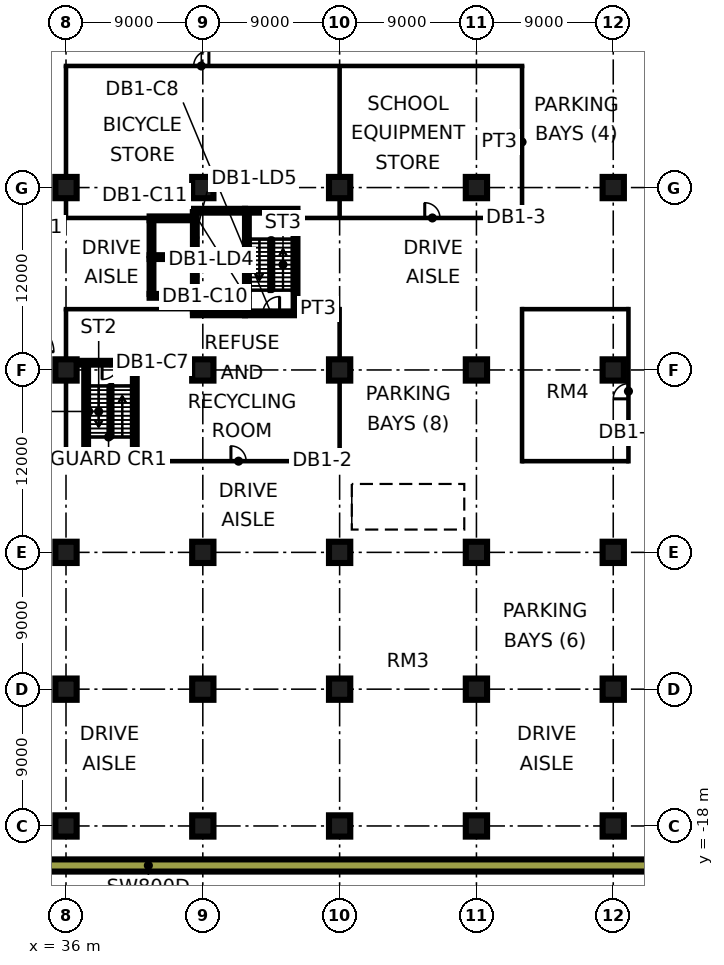
"""IFC4 building model, lengths in metres.
Left out: names, types, materials, properties, quantities, classifications, styles, units other than length and angle.
Written with IfcOpenShell. Run it as: python <this file> out.ifc"""

import sys

from ifc_helpers import new_model, si_unit, direction, frame, frame_2d, origin, origin_2d, place, context, subcontext, project, spatial, rectangle, extrude, element, fill, save


model = new_model("IFC4")
c1 = context("Model", 3, precision=1e-05, world=origin(), true_north=direction((0.0, 1.0)))
c2 = subcontext(c1, "Body", "Model", "MODEL_VIEW")
j1 = project(units=[si_unit("LENGTHUNIT", "METRE"), si_unit("PLANEANGLEUNIT", "RADIAN")], contexts=[c1])
p1 = place(None, origin())
s1 = spatial("IfcSite", under=j1, at=p1, CompositionType="ELEMENT")
p2 = place(p1, origin())
s2 = spatial("IfcBuilding", under=s1, at=p2, CompositionType="ELEMENT")
p3 = place(p2, frame((0.0, 0.0, -4.5)))
s3 = spatial("IfcBuildingStorey", under=s2, at=p3, CompositionType="ELEMENT", Elevation=-4.5)
for number, where, z_axis, x_axis in (
    (1, (36.0, -18.0, 0.0), (0.0, 0.0, 1.0), (1.0, 0.0, 0.0)),
    (2, (36.0, -9.0, 0.0), (0.0, 0.0, 1.0), (1.0, 0.0, 0.0)),
    (3, (36.0, 0.0, 0.0), (0.0, 0.0, 1.0), (1.0, 0.0, 0.0)),
    (4, (36.0, 12.0, 0.0), (0.0, 0.0, 1.0), (1.0, 0.0, 0.0)),
    (5, (36.0, 24.0, 0.0), (0.0, 0.0, 1.0), (1.0, 0.0, 0.0)),
    (6, (45.0, -18.0, 0.0), (0.0, 0.0, 1.0), (1.0, 0.0, 0.0)),
    (7, (45.0, -9.0, 0.0), (0.0, 0.0, 1.0), (1.0, 0.0, 0.0)),
    (8, (45.0, 0.0, 0.0), (0.0, 0.0, 1.0), (1.0, 0.0, 0.0)),
    (9, (45.0, 12.0, 0.0), (0.0, 0.0, 1.0), (1.0, 0.0, 0.0)),
    (10, (45.0, 24.0, 0.0), (0.0, 0.0, 1.0), (1.0, 0.0, 0.0)),
    (11, (54.0, -18.0, 0.0), (0.0, 0.0, 1.0), (1.0, 0.0, 0.0)),
    (12, (54.0, -9.0, 0.0), (0.0, 0.0, 1.0), (1.0, 0.0, 0.0)),
    (13, (54.0, 0.0, 0.0), (0.0, 0.0, 1.0), (1.0, 0.0, 0.0)),
    (14, (54.0, 12.0, 0.0), (0.0, 0.0, 1.0), (1.0, 0.0, 0.0)),
    (15, (54.0, 24.0, 0.0), (0.0, 0.0, 1.0), (1.0, 0.0, 0.0)),
    (16, (63.0, -18.0, 0.0), (0.0, 0.0, 1.0), (1.0, 0.0, 0.0)),
    (17, (63.0, -9.0, 0.0), (0.0, 0.0, 1.0), (1.0, 0.0, 0.0)),
    (18, (63.0, 0.0, 0.0), (0.0, 0.0, 1.0), (1.0, 0.0, 0.0)),
    (19, (63.0, 12.0, 0.0), (0.0, 0.0, 1.0), (1.0, 0.0, 0.0)),
    (20, (63.0, 24.0, 0.0), (0.0, 0.0, 1.0), (1.0, 0.0, 0.0)),
    (21, (72.0, -18.0, 0.0), (0.0, 0.0, 1.0), (1.0, 0.0, 0.0)),
    (22, (72.0, -9.0, 0.0), (0.0, 0.0, 1.0), (1.0, 0.0, 0.0)),
    (23, (72.0, 0.0, 0.0), (0.0, 0.0, 1.0), (1.0, 0.0, 0.0)),
    (24, (72.0, 12.0, 0.0), (0.0, 0.0, 1.0), (1.0, 0.0, 0.0)),
    (25, (72.0, 24.0, 0.0), (0.0, 0.0, 1.0), (1.0, 0.0, 0.0)),
):
    element("IfcColumn", number, at=place(p3, frame(where, z_axis=z_axis, x_axis=x_axis)), inside=s3, PredefinedType="COLUMN", context=c2, shape_type="SweptSolid", body=[
        extrude(rectangle(XDim=1.4, YDim=1.4, at=origin_2d()), origin(), (0.0, 0.0, 1.0), 4.5),
    ])
p4 = place(p3, frame((37.2, 5.725, 0.0), z_axis=(0.0, 0.0, 1.0), x_axis=(1.0, 0.0, 0.0)))
e26 = element("IfcWall", 26, at=p4, inside=s3, PredefinedType="SHEAR", context=c2, shape_type="SweptSolid", body=[
    extrude(rectangle(XDim=3.45, YDim=0.25, at=frame_2d((1.725, 0.0))), origin(), (0.0, 0.0, 1.0), 4.5),
])
p5 = place(p3, frame((36.7, 12.475, 0.0), z_axis=(0.0, 0.0, 1.0), x_axis=(1.0, 0.0, 0.0)))
e27 = element("IfcWall", 27, at=p5, inside=s3, PredefinedType="SHEAR", context=c2, shape_type="SweptSolid", body=[
    extrude(rectangle(XDim=3.95, YDim=0.25, at=frame_2d((1.975, 0.0))), origin(), (0.0, 0.0, 1.0), 4.5),
])
p6 = place(p5, frame((1.675, 0.0, 0.0)))
e28 = element("IfcOpeningElement", 28, at=p6, cuts=e27, PredefinedType="OPENING", context=c2, shape_type="SweptSolid", body=[
    extrude(rectangle(XDim=1.1, YDim=2.2, at=frame_2d((0.55, 1.1))), frame((0.0, 0.135, 0.0), z_axis=(0.0, -1.0, 0.0), x_axis=(1.0, 0.0, 0.0)), (0.0, 0.0, 1.0), 0.27),
])
for number, where, z_axis, x_axis in (
    (29, (37.325, 5.85, 0.0), (0.0, 0.0, 1.0), (0.0, 1.0, 0.0)),
    (30, (40.525, 5.85, 0.0), (0.0, 0.0, 1.0), (0.0, 1.0, 0.0)),
):
    element("IfcWall", number, at=place(p3, frame(where, z_axis=z_axis, x_axis=x_axis)), inside=s3, PredefinedType="SHEAR", context=c2, shape_type="SweptSolid", body=[
        extrude(rectangle(XDim=6.5, YDim=0.25, at=frame_2d((3.25, 0.0))), origin(), (0.0, 0.0, 1.0), 4.5),
    ])
p7 = place(p3, frame((47.775, 15.725, 0.0), z_axis=(0.0, 0.0, 1.0), x_axis=(1.0, 0.0, 0.0)))
e31 = element("IfcWall", 31, at=p7, inside=s3, PredefinedType="SHEAR", context=c2, shape_type="SweptSolid", body=[
    extrude(rectangle(XDim=3.45, YDim=0.25, at=frame_2d((1.725, 0.0))), origin(), (0.0, 0.0, 1.0), 4.5),
])
p8 = place(p7, frame((1.175, 0.0, 0.0)))
e32 = element("IfcOpeningElement", 32, at=p8, cuts=e31, PredefinedType="OPENING", context=c2, shape_type="SweptSolid", body=[
    extrude(rectangle(XDim=1.1, YDim=2.2, at=frame_2d((0.55, 1.1))), frame((0.0, 0.135, 0.0), z_axis=(0.0, -1.0, 0.0), x_axis=(1.0, 0.0, 0.0)), (0.0, 0.0, 1.0), 0.27),
])
p9 = place(p3, frame((47.775, 22.475, 0.0), z_axis=(0.0, 0.0, 1.0), x_axis=(1.0, 0.0, 0.0)))
e33 = element("IfcWall", 33, at=p9, inside=s3, PredefinedType="SHEAR", context=c2, shape_type="SweptSolid", body=[
    extrude(rectangle(XDim=3.45, YDim=0.25, at=frame_2d((1.725, 0.0))), origin(), (0.0, 0.0, 1.0), 4.5),
])
p10 = place(p3, frame((47.9, 15.85, 0.0), z_axis=(0.0, 0.0, 1.0), x_axis=(0.0, 1.0, 0.0)))
e34 = element("IfcWall", 34, at=p10, inside=s3, PredefinedType="SHEAR", context=c2, shape_type="SweptSolid", body=[
    extrude(rectangle(XDim=6.5, YDim=0.25, at=frame_2d((3.25, 0.0))), origin(), (0.0, 0.0, 1.0), 4.5),
])
p11 = place(p10, frame((0.35, 0.0, 0.0)))
e35 = element("IfcOpeningElement", 35, at=p11, cuts=e34, PredefinedType="OPENING", context=c2, shape_type="SweptSolid", body=[
    extrude(rectangle(XDim=1.1, YDim=2.2, at=frame_2d((0.55, 1.1))), frame((0.0, 0.135, 0.0), z_axis=(0.0, -1.0, 0.0), x_axis=(1.0, 0.0, 0.0)), (0.0, 0.0, 1.0), 0.27),
])
p12 = place(p3, frame((51.1, 15.85, 0.0), z_axis=(0.0, 0.0, 1.0), x_axis=(0.0, 1.0, 0.0)))
e36 = element("IfcWall", 36, at=p12, inside=s3, PredefinedType="SHEAR", context=c2, shape_type="SweptSolid", body=[
    extrude(rectangle(XDim=6.5, YDim=0.25, at=frame_2d((3.25, 0.0))), origin(), (0.0, 0.0, 1.0), 4.5),
])
p13 = place(p3, frame((44.35, 15.725, 0.0), z_axis=(0.0, 0.0, 1.0), x_axis=(1.0, 0.0, 0.0)))
e37 = element("IfcWall", 37, at=p13, inside=s3, PredefinedType="SHEAR", context=c2, shape_type="SweptSolid", body=[
    extrude(rectangle(XDim=3.425, YDim=0.25, at=frame_2d((1.712, 0.0))), origin(), (0.0, 0.0, 1.0), 4.5),
])
p14 = place(p13, frame((1.25, 0.0, 0.0)))
e38 = element("IfcOpeningElement", 38, at=p14, cuts=e37, PredefinedType="OPENING", context=c2, shape_type="SweptSolid", body=[
    extrude(rectangle(XDim=1.2, YDim=2.2, at=frame_2d((0.6, 1.1))), frame((0.0, 0.135, 0.0), z_axis=(0.0, -1.0, 0.0), x_axis=(1.0, 0.0, 0.0)), (0.0, 0.0, 1.0), 0.27),
])
p15 = place(p3, frame((44.35, 22.475, 0.0), z_axis=(0.0, 0.0, 1.0), x_axis=(1.0, 0.0, 0.0)))
e39 = element("IfcWall", 39, at=p15, inside=s3, PredefinedType="SHEAR", context=c2, shape_type="SweptSolid", body=[
    extrude(rectangle(XDim=3.425, YDim=0.25, at=frame_2d((1.712, 0.0))), origin(), (0.0, 0.0, 1.0), 4.5),
])
p16 = place(p3, frame((44.475, 15.85, 0.0), z_axis=(0.0, 0.0, 1.0), x_axis=(0.0, 1.0, 0.0)))
e40 = element("IfcWall", 40, at=p16, inside=s3, PredefinedType="SHEAR", context=c2, shape_type="SweptSolid", body=[
    extrude(rectangle(XDim=6.5, YDim=0.25, at=frame_2d((3.25, 0.0))), origin(), (0.0, 0.0, 1.0), 4.5),
])
p17 = place(p16, frame((1.75, 0.0, 0.0)))
e41 = element("IfcOpeningElement", 41, at=p17, cuts=e40, PredefinedType="OPENING", context=c2, shape_type="SweptSolid", body=[
    extrude(rectangle(XDim=1.1, YDim=2.2, at=frame_2d((0.55, 1.1))), frame((0.0, 0.135, 0.0), z_axis=(0.0, -1.0, 0.0), x_axis=(1.0, 0.0, 0.0)), (0.0, 0.0, 1.0), 0.27),
])
p18 = place(p16, frame((4.3, 0.0, 0.0)))
e42 = element("IfcOpeningElement", 42, at=p18, cuts=e40, PredefinedType="OPENING", context=c2, shape_type="SweptSolid", body=[
    extrude(rectangle(XDim=1.1, YDim=2.2, at=frame_2d((0.55, 1.1))), frame((0.0, 0.135, 0.0), z_axis=(0.0, -1.0, 0.0), x_axis=(1.0, 0.0, 0.0)), (0.0, 0.0, 1.0), 0.27),
])
for number, where, z_axis, x_axis in (
    (43, (41.5, 16.875, 0.0), (0.0, 0.0, 1.0), (1.0, 0.0, 0.0)),
    (44, (41.5, 19.425, 0.0), (0.0, 0.0, 1.0), (1.0, 0.0, 0.0)),
    (45, (41.5, 21.975, 0.0), (0.0, 0.0, 1.0), (1.0, 0.0, 0.0)),
):
    element("IfcWall", number, at=place(p3, frame(where, z_axis=z_axis, x_axis=x_axis)), inside=s3, PredefinedType="SHEAR", context=c2, shape_type="SweptSolid", body=[
        extrude(rectangle(XDim=2.85, YDim=0.25, at=frame_2d((1.425, 0.0))), origin(), (0.0, 0.0, 1.0), 4.5),
    ])
for number, where, z_axis, x_axis in (
    (46, (41.625, 17.0, 0.0), (0.0, 0.0, 1.0), (0.0, 1.0, 0.0)),
    (47, (41.625, 19.55, 0.0), (0.0, 0.0, 1.0), (0.0, 1.0, 0.0)),
):
    element("IfcWall", number, at=place(p3, frame(where, z_axis=z_axis, x_axis=x_axis)), inside=s3, PredefinedType="SHEAR", context=c2, shape_type="SweptSolid", body=[
        extrude(rectangle(XDim=2.3, YDim=0.25, at=frame_2d((1.15, 0.0))), origin(), (0.0, 0.0, 1.0), 4.5),
    ])
p19 = place(p3, frame((4.423, -20.6, 0.0), z_axis=(0.0, 0.0, 1.0), x_axis=(1.0, 0.0, 0.0)))
e48 = element("IfcWall", 48, at=p19, inside=s3, PredefinedType="SOLIDWALL", context=c2, shape_type="SweptSolid", body=[
    extrude(rectangle(XDim=73.989, YDim=0.8, at=frame_2d((36.994, 0.0))), origin(), (0.0, 0.0, 1.0), 4.5),
])
p20 = place(p3, frame((35.95, 16.0, 0.0), z_axis=(0.0, 0.0, 1.0), x_axis=(1.0, 0.0, 0.0)))
e49 = element("IfcWall", 49, at=p20, inside=s3, PredefinedType="PARTITIONING", context=c2, shape_type="SweptSolid", body=[
    extrude(rectangle(XDim=8.4, YDim=0.1, at=frame_2d((4.2, 0.0))), origin(), (0.0, 0.0, 1.0), 4.05),
])
p21 = place(p3, frame((35.95, 22.0, 0.0), z_axis=(0.0, 0.0, 1.0), x_axis=(1.0, 0.0, 0.0)))
e50 = element("IfcWall", 50, at=p21, inside=s3, PredefinedType="PARTITIONING", context=c2, shape_type="SweptSolid", body=[
    extrude(rectangle(XDim=5.55, YDim=0.1, at=frame_2d((2.775, 0.0))), origin(), (0.0, 0.0, 1.0), 4.05),
])
p22 = place(p3, frame((35.95, 32.0, 0.0), z_axis=(0.0, 0.0, 1.0), x_axis=(1.0, 0.0, 0.0)))
e51 = element("IfcWall", 51, at=p22, inside=s3, PredefinedType="PARTITIONING", context=c2, shape_type="SweptSolid", body=[
    extrude(rectangle(XDim=30.1, YDim=0.1, at=frame_2d((15.05, 0.0))), origin(), (0.0, 0.0, 1.0), 4.05),
])
p23 = place(p22, frame((8.45, 0.0, 0.0)))
e52 = element("IfcOpeningElement", 52, at=p23, cuts=e51, PredefinedType="OPENING", context=c2, shape_type="SweptSolid", body=[
    extrude(rectangle(XDim=1.0, YDim=2.1, at=frame_2d((0.5, 1.05))), frame((0.0, 0.06, 0.0), z_axis=(0.0, -1.0, 0.0), x_axis=(1.0, 0.0, 0.0)), (0.0, 0.0, 1.0), 0.12),
])
p24 = place(p3, frame((36.0, 5.95, 0.0), z_axis=(0.0, 0.0, 1.0), x_axis=(0.0, 1.0, 0.0)))
e53 = element("IfcWall", 53, at=p24, inside=s3, PredefinedType="PARTITIONING", context=c2, shape_type="SweptSolid", body=[
    extrude(rectangle(XDim=5.351, YDim=0.1, at=frame_2d((2.676, 0.0))), origin(), (0.0, 0.0, 1.0), 4.05),
])
p25 = place(p3, frame((36.0, 12.699, 0.0), z_axis=(0.0, 0.0, 1.0), x_axis=(0.0, 1.0, 0.0)))
e54 = element("IfcWall", 54, at=p25, inside=s3, PredefinedType="PARTITIONING", context=c2, shape_type="SweptSolid", body=[
    extrude(rectangle(XDim=3.251, YDim=0.1, at=frame_2d((1.625, 0.0))), origin(), (0.0, 0.0, 1.0), 4.05),
])
p26 = place(p3, frame((36.0, 22.05, 0.0), z_axis=(0.0, 0.0, 1.0), x_axis=(0.0, 1.0, 0.0)))
e55 = element("IfcWall", 55, at=p26, inside=s3, PredefinedType="PARTITIONING", context=c2, shape_type="SweptSolid", body=[
    extrude(rectangle(XDim=1.251, YDim=0.1, at=frame_2d((0.625, 0.0))), origin(), (0.0, 0.0, 1.0), 4.05),
])
p27 = place(p3, frame((36.0, 24.699, 0.0), z_axis=(0.0, 0.0, 1.0), x_axis=(0.0, 1.0, 0.0)))
e56 = element("IfcWall", 56, at=p27, inside=s3, PredefinedType="PARTITIONING", context=c2, shape_type="SweptSolid", body=[
    extrude(rectangle(XDim=7.251, YDim=0.1, at=frame_2d((3.625, 0.0))), origin(), (0.0, 0.0, 1.0), 4.05),
])
p28 = place(p3, frame((36.05, 6.0, 0.0), z_axis=(0.0, 0.0, 1.0), x_axis=(1.0, 0.0, 0.0)))
e57 = element("IfcWall", 57, at=p28, inside=s3, PredefinedType="PARTITIONING", context=c2, shape_type="SweptSolid", body=[
    extrude(rectangle(XDim=1.15, YDim=0.1, at=frame_2d((0.575, 0.0))), origin(), (0.0, 0.0, 1.0), 4.05),
])
p29 = place(p3, frame((40.65, 6.0, 0.0), z_axis=(0.0, 0.0, 1.0), x_axis=(1.0, 0.0, 0.0)))
e58 = element("IfcWall", 58, at=p29, inside=s3, PredefinedType="PARTITIONING", context=c2, shape_type="SweptSolid", body=[
    extrude(rectangle(XDim=13.4, YDim=0.1, at=frame_2d((6.7, 0.0))), origin(), (0.0, 0.0, 1.0), 4.05),
])
p30 = place(p29, frame((6.2, 0.0, 0.0)))
e59 = element("IfcOpeningElement", 59, at=p30, cuts=e58, PredefinedType="OPENING", context=c2, shape_type="SweptSolid", body=[
    extrude(rectangle(XDim=1.0, YDim=2.1, at=frame_2d((0.5, 1.05))), frame((0.0, 0.06, 0.0), z_axis=(0.0, -1.0, 0.0), x_axis=(1.0, 0.0, 0.0)), (0.0, 0.0, 1.0), 0.12),
])
p31 = place(p3, frame((51.225, 16.0, 0.0), z_axis=(0.0, 0.0, 1.0), x_axis=(1.0, 0.0, 0.0)))
e60 = element("IfcWall", 60, at=p31, inside=s3, PredefinedType="PARTITIONING", context=c2, shape_type="SweptSolid", body=[
    extrude(rectangle(XDim=2.725, YDim=0.1, at=frame_2d((1.362, 0.0))), origin(), (0.0, 0.0, 1.0), 4.05),
])
p32 = place(p3, frame((51.225, 22.0, 0.0), z_axis=(0.0, 0.0, 1.0), x_axis=(1.0, 0.0, 0.0)))
e61 = element("IfcWall", 61, at=p32, inside=s3, PredefinedType="PARTITIONING", context=c2, shape_type="SweptSolid", body=[
    extrude(rectangle(XDim=14.825, YDim=0.1, at=frame_2d((7.413, 0.0))), origin(), (0.0, 0.0, 1.0), 4.05),
])
p33 = place(p32, frame((8.375, 0.0, 0.0)))
e62 = element("IfcOpeningElement", 62, at=p33, cuts=e61, PredefinedType="OPENING", context=c2, shape_type="SweptSolid", body=[
    extrude(rectangle(XDim=1.0, YDim=2.1, at=frame_2d((0.5, 1.05))), frame((0.0, 0.06, 0.0), z_axis=(0.0, -1.0, 0.0), x_axis=(1.0, 0.0, 0.0)), (0.0, 0.0, 1.0), 0.12),
])
p34 = place(p3, frame((54.0, 6.05, 0.0), z_axis=(0.0, 0.0, 1.0), x_axis=(0.0, 1.0, 0.0)))
e63 = element("IfcWall", 63, at=p34, inside=s3, PredefinedType="PARTITIONING", context=c2, shape_type="SweptSolid", body=[
    extrude(rectangle(XDim=5.251, YDim=0.1, at=frame_2d((2.625, 0.0))), origin(), (0.0, 0.0, 1.0), 4.05),
])
p35 = place(p3, frame((54.0, 12.699, 0.0), z_axis=(0.0, 0.0, 1.0), x_axis=(0.0, 1.0, 0.0)))
e64 = element("IfcWall", 64, at=p35, inside=s3, PredefinedType="PARTITIONING", context=c2, shape_type="SweptSolid", body=[
    extrude(rectangle(XDim=3.351, YDim=0.1, at=frame_2d((1.676, 0.0))), origin(), (0.0, 0.0, 1.0), 4.05),
])
p36 = place(p3, frame((54.0, 22.05, 0.0), z_axis=(0.0, 0.0, 1.0), x_axis=(0.0, 1.0, 0.0)))
e65 = element("IfcWall", 65, at=p36, inside=s3, PredefinedType="PARTITIONING", context=c2, shape_type="SweptSolid", body=[
    extrude(rectangle(XDim=1.251, YDim=0.1, at=frame_2d((0.625, 0.0))), origin(), (0.0, 0.0, 1.0), 4.05),
])
p37 = place(p3, frame((54.0, 24.699, 0.0), z_axis=(0.0, 0.0, 1.0), x_axis=(0.0, 1.0, 0.0)))
e66 = element("IfcWall", 66, at=p37, inside=s3, PredefinedType="PARTITIONING", context=c2, shape_type="SweptSolid", body=[
    extrude(rectangle(XDim=7.251, YDim=0.1, at=frame_2d((3.625, 0.0))), origin(), (0.0, 0.0, 1.0), 4.05),
])
p38 = place(p3, frame((66.0, 5.95, 0.0), z_axis=(0.0, 0.0, 1.0), x_axis=(0.0, 1.0, 0.0)))
e67 = element("IfcWall", 67, at=p38, inside=s3, PredefinedType="PARTITIONING", context=c2, shape_type="SweptSolid", body=[
    extrude(rectangle(XDim=10.1, YDim=0.1, at=frame_2d((5.05, 0.0))), origin(), (0.0, 0.0, 1.0), 4.05),
])
p39 = place(p3, frame((66.0, 22.05, 0.0), z_axis=(0.0, 0.0, 1.0), x_axis=(0.0, 1.0, 0.0)))
e68 = element("IfcWall", 68, at=p39, inside=s3, PredefinedType="PARTITIONING", context=c2, shape_type="SweptSolid", body=[
    extrude(rectangle(XDim=9.9, YDim=0.1, at=frame_2d((4.95, 0.0))), origin(), (0.0, 0.0, 1.0), 4.05),
])
for number, where, z_axis, x_axis in (
    (69, (66.05, 6.0, 0.0), (0.0, 0.0, 1.0), (1.0, 0.0, 0.0)),
    (70, (66.05, 16.0, 0.0), (0.0, 0.0, 1.0), (1.0, 0.0, 0.0)),
):
    element("IfcWall", number, at=place(p3, frame(where, z_axis=z_axis, x_axis=x_axis)), inside=s3, PredefinedType="PARTITIONING", context=c2, shape_type="SweptSolid", body=[
        extrude(rectangle(XDim=6.9, YDim=0.1, at=frame_2d((3.45, 0.0))), origin(), (0.0, 0.0, 1.0), 4.05),
    ])
p40 = place(p3, frame((73.0, 5.95, 0.0), z_axis=(0.0, 0.0, 1.0), x_axis=(0.0, 1.0, 0.0)))
e71 = element("IfcWall", 71, at=p40, inside=s3, PredefinedType="PARTITIONING", context=c2, shape_type="SweptSolid", body=[
    extrude(rectangle(XDim=10.1, YDim=0.1, at=frame_2d((5.05, 0.0))), origin(), (0.0, 0.0, 1.0), 4.05),
])
p41 = place(p40, frame((4.15, 0.0, 0.0)))
e72 = element("IfcOpeningElement", 72, at=p41, cuts=e71, PredefinedType="OPENING", context=c2, shape_type="SweptSolid", body=[
    extrude(rectangle(XDim=1.0, YDim=2.1, at=frame_2d((0.5, 1.05))), frame((0.0, 0.06, 0.0), z_axis=(0.0, -1.0, 0.0), x_axis=(1.0, 0.0, 0.0)), (0.0, 0.0, 1.0), 0.12),
])
p42 = place(p6, frame((1.1, 0.0, 0.0), z_axis=(0.0, 0.0, 1.0), x_axis=(-1.0, 0.0, 0.0)))
e73 = element("IfcDoor", 73, at=p42, inside=s3, OperationType="SINGLE_SWING_LEFT", PredefinedType="DOOR", context=c2, shape_type="SweptSolid", body=[
    extrude(rectangle(XDim=1.1, YDim=2.2, at=frame_2d((0.55, 1.1))), frame((0.0, 0.025, 0.0), z_axis=(0.0, -1.0, 0.0), x_axis=(1.0, 0.0, 0.0)), (0.0, 0.0, 1.0), 0.05),
])
fill(e28, e73)
p43 = place(p8, frame((1.1, 0.0, 0.0), z_axis=(0.0, 0.0, 1.0), x_axis=(-1.0, 0.0, 0.0)))
e74 = element("IfcDoor", 74, at=p43, inside=s3, OperationType="SINGLE_SWING_RIGHT", PredefinedType="DOOR", context=c2, shape_type="SweptSolid", body=[
    extrude(rectangle(XDim=1.1, YDim=2.2, at=frame_2d((0.55, 1.1))), frame((0.0, 0.025, 0.0), z_axis=(0.0, -1.0, 0.0), x_axis=(1.0, 0.0, 0.0)), (0.0, 0.0, 1.0), 0.05),
])
fill(e32, e74)
p44 = place(p14, frame((1.2, 0.0, 0.0), z_axis=(0.0, 0.0, 1.0), x_axis=(-1.0, 0.0, 0.0)))
e75 = element("IfcDoor", 75, at=p44, inside=s3, OperationType="SINGLE_SWING_RIGHT", PredefinedType="DOOR", context=c2, shape_type="SweptSolid", body=[
    extrude(rectangle(XDim=1.2, YDim=2.2, at=frame_2d((0.6, 1.1))), frame((0.0, 0.025, 0.0), z_axis=(0.0, -1.0, 0.0), x_axis=(1.0, 0.0, 0.0)), (0.0, 0.0, 1.0), 0.05),
])
fill(e38, e75)
p45 = place(p11, frame((1.1, 0.0, 0.0), z_axis=(0.0, 0.0, 1.0), x_axis=(-1.0, 0.0, 0.0)))
e76 = element("IfcDoor", 76, at=p45, inside=s3, OperationType="SINGLE_SWING_RIGHT", PredefinedType="DOOR", context=c2, shape_type="SweptSolid", body=[
    extrude(rectangle(XDim=1.1, YDim=2.2, at=frame_2d((0.55, 1.1))), frame((0.0, 0.025, 0.0), z_axis=(0.0, -1.0, 0.0), x_axis=(1.0, 0.0, 0.0)), (0.0, 0.0, 1.0), 0.05),
])
fill(e35, e76)
p46 = place(p17, origin())
e77 = element("IfcDoor", 77, at=p46, inside=s3, OperationType="DOUBLE_DOOR_SLIDING", PredefinedType="DOOR", context=c2, shape_type="SweptSolid", body=[
    extrude(rectangle(XDim=1.1, YDim=2.2, at=frame_2d((0.55, 1.1))), frame((0.0, 0.025, 0.0), z_axis=(0.0, -1.0, 0.0), x_axis=(1.0, 0.0, 0.0)), (0.0, 0.0, 1.0), 0.05),
])
fill(e41, e77)
p47 = place(p18, origin())
e78 = element("IfcDoor", 78, at=p47, inside=s3, OperationType="DOUBLE_DOOR_SLIDING", PredefinedType="DOOR", context=c2, shape_type="SweptSolid", body=[
    extrude(rectangle(XDim=1.1, YDim=2.2, at=frame_2d((0.55, 1.1))), frame((0.0, 0.025, 0.0), z_axis=(0.0, -1.0, 0.0), x_axis=(1.0, 0.0, 0.0)), (0.0, 0.0, 1.0), 0.05),
])
fill(e42, e78)
p48 = place(p23, frame((1.0, 0.0, 0.0), z_axis=(0.0, 0.0, 1.0), x_axis=(-1.0, 0.0, 0.0)))
e79 = element("IfcDoor", 79, at=p48, inside=s3, OperationType="SINGLE_SWING_RIGHT", PredefinedType="DOOR", context=c2, shape_type="SweptSolid", body=[
    extrude(rectangle(XDim=1.0, YDim=2.1, at=frame_2d((0.5, 1.05))), frame((0.0, 0.025, 0.0), z_axis=(0.0, -1.0, 0.0), x_axis=(1.0, 0.0, 0.0)), (0.0, 0.0, 1.0), 0.05),
])
fill(e52, e79)
p49 = place(p30, origin())
e80 = element("IfcDoor", 80, at=p49, inside=s3, OperationType="SINGLE_SWING_LEFT", PredefinedType="DOOR", context=c2, shape_type="SweptSolid", body=[
    extrude(rectangle(XDim=1.0, YDim=2.1, at=frame_2d((0.5, 1.05))), frame((0.0, 0.025, 0.0), z_axis=(0.0, -1.0, 0.0), x_axis=(1.0, 0.0, 0.0)), (0.0, 0.0, 1.0), 0.05),
])
fill(e59, e80)
p50 = place(p33, origin())
e81 = element("IfcDoor", 81, at=p50, inside=s3, OperationType="SINGLE_SWING_LEFT", PredefinedType="DOOR", context=c2, shape_type="SweptSolid", body=[
    extrude(rectangle(XDim=1.0, YDim=2.1, at=frame_2d((0.5, 1.05))), frame((0.0, 0.025, 0.0), z_axis=(0.0, -1.0, 0.0), x_axis=(1.0, 0.0, 0.0)), (0.0, 0.0, 1.0), 0.05),
])
fill(e62, e81)
p51 = place(p41, origin())
e82 = element("IfcDoor", 82, at=p51, inside=s3, OperationType="SINGLE_SWING_LEFT", PredefinedType="DOOR", context=c2, shape_type="SweptSolid", body=[
    extrude(rectangle(XDim=1.0, YDim=2.1, at=frame_2d((0.5, 1.05))), frame((0.0, 0.025, 0.0), z_axis=(0.0, -1.0, 0.0), x_axis=(1.0, 0.0, 0.0)), (0.0, 0.0, 1.0), 0.05),
])
fill(e72, e82)
save(model, sys.argv[1])
